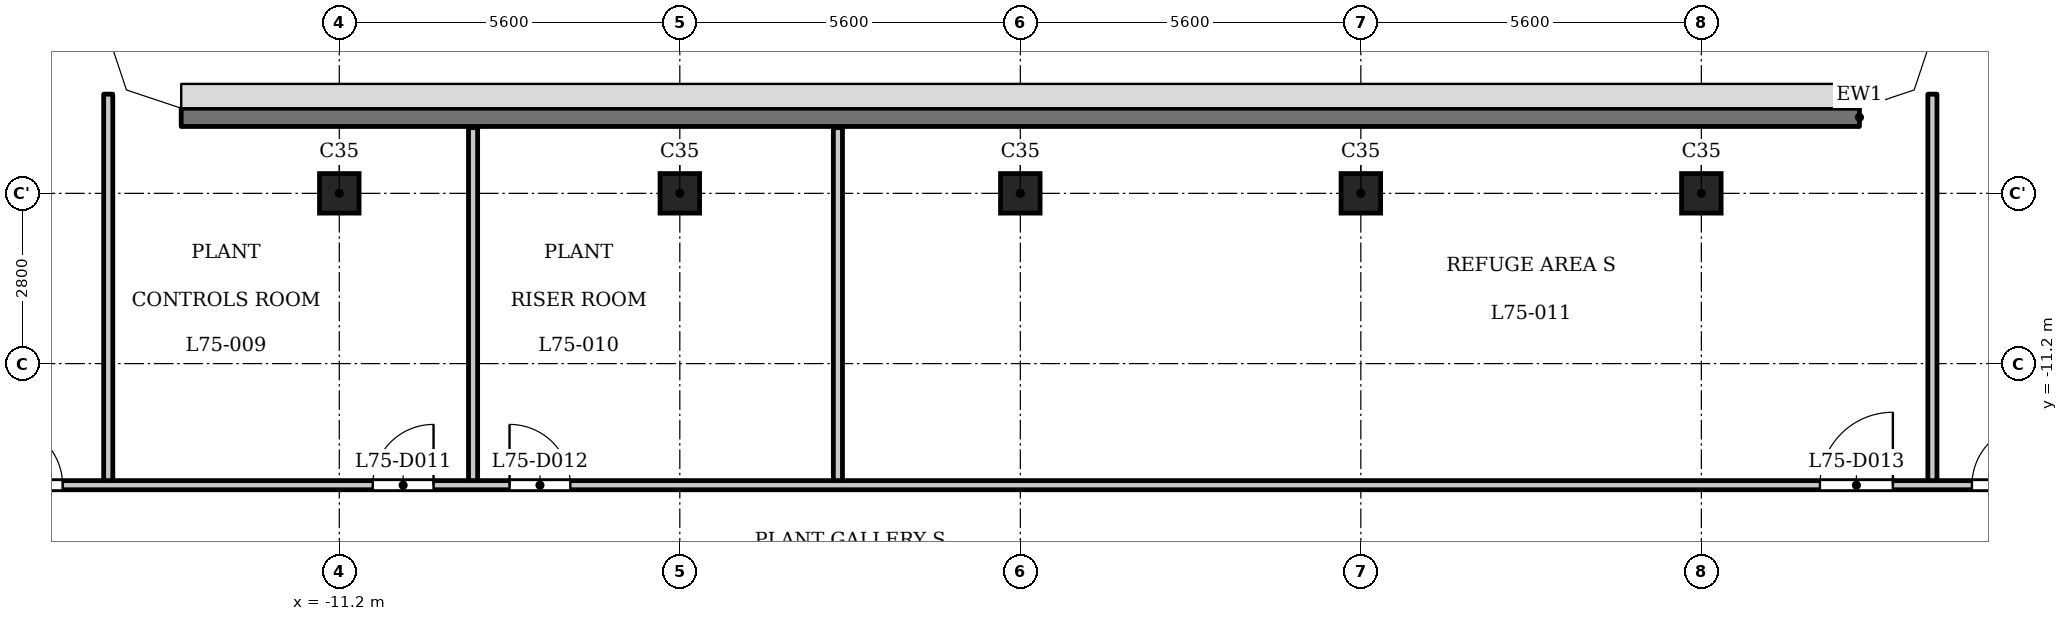
"""IFC4 building model, lengths in metres.
Left out: names, types, materials, properties, quantities, classifications, styles, units other than length and angle.
Written with IfcOpenShell. Run it as: python <this file> out.ifc"""

import sys

from ifc_helpers import new_model, si_unit, direction, frame, frame_2d, origin, origin_2d, place, context, subcontext, project, spatial, polyline, rectangle, outline, extrude, element, fill, save


model = new_model("IFC4")
c1 = context("Model", 3, precision=1e-05, world=origin(), true_north=direction((0.0, 1.0)))
c2 = subcontext(c1, "Body", "Model", "MODEL_VIEW")
j1 = project(units=[si_unit("LENGTHUNIT", "METRE"), si_unit("PLANEANGLEUNIT", "RADIAN")], contexts=[c1])
p1 = place(None, origin())
s1 = spatial("IfcSite", under=j1, at=p1, CompositionType="ELEMENT")
p2 = place(p1, origin())
s2 = spatial("IfcBuilding", under=s1, at=p2, CompositionType="ELEMENT")
p3 = place(p2, frame((0.0, 0.0, 289.1)))
s3 = spatial("IfcBuildingStorey", under=s2, at=p3, CompositionType="ELEMENT", Elevation=289.1)
for number, where, z_axis, x_axis in (
    (1, (-11.2, -8.4, 0.0), (0.0, 0.0, 1.0), (1.0, 0.0, 0.0)),
    (2, (-5.6, -8.4, 0.0), (0.0, 0.0, 1.0), (1.0, 0.0, 0.0)),
    (3, (0.0, -8.4, 0.0), (0.0, 0.0, 1.0), (1.0, 0.0, 0.0)),
    (4, (5.6, -8.4, 0.0), (0.0, 0.0, 1.0), (1.0, 0.0, 0.0)),
    (5, (11.2, -8.4, 0.0), (0.0, 0.0, 1.0), (1.0, 0.0, 0.0)),
):
    element("IfcColumn", number, at=place(p3, frame(where, z_axis=z_axis, x_axis=x_axis)), inside=s3, PredefinedType="COLUMN", context=c2, shape_type="SweptSolid", body=[
        extrude(rectangle(XDim=0.65, YDim=0.65, at=origin_2d()), origin(), (0.0, 0.0, 1.0), 5.4),
    ])
p4 = place(p3, frame((13.8, -7.15, 0.0), z_axis=(0.0, 0.0, 1.0), x_axis=(-1.0, 0.0, 0.0)))
e6 = element("IfcWall", 6, at=p4, inside=s3, PredefinedType="SOLIDWALL", context=c2, shape_type="SweptSolid", body=[
    extrude(rectangle(XDim=27.6, YDim=0.3, at=frame_2d((13.8, 0.0))), origin(), (0.0, 0.0, 1.0), 5.0),
])
p5 = place(p3, frame((-17.4, -13.2, 0.0), z_axis=(0.0, 0.0, 1.0), x_axis=(1.0, 0.0, 0.0)))
e7 = element("IfcWall", 7, at=p5, inside=s3, PredefinedType="PARTITIONING", context=c2, shape_type="SweptSolid", body=[
    extrude(rectangle(XDim=34.8, YDim=0.15, at=frame_2d((17.4, 0.0))), origin(), (0.0, 0.0, 1.0), 5.0),
])
p6 = place(p5, frame((0.65, 0.0, 0.0)))
e8 = element("IfcOpeningElement", 8, at=p6, cuts=e7, PredefinedType="OPENING", context=c2, shape_type="SweptSolid", body=[
    extrude(rectangle(XDim=1.0, YDim=2.1, at=frame_2d((0.5, 1.05))), frame((0.0, 0.085, 0.0), z_axis=(0.0, -1.0, 0.0), x_axis=(1.0, 0.0, 0.0)), (0.0, 0.0, 1.0), 0.17),
])
p7 = place(p5, frame((33.05, 0.0, 0.0)))
e9 = element("IfcOpeningElement", 9, at=p7, cuts=e7, PredefinedType="OPENING", context=c2, shape_type="SweptSolid", body=[
    extrude(rectangle(XDim=1.0, YDim=2.1, at=frame_2d((0.5, 1.05))), frame((0.0, 0.085, 0.0), z_axis=(0.0, -1.0, 0.0), x_axis=(1.0, 0.0, 0.0)), (0.0, 0.0, 1.0), 0.17),
])
p8 = place(p5, frame((6.75, 0.0, 0.0)))
e10 = element("IfcOpeningElement", 10, at=p8, cuts=e7, PredefinedType="OPENING", context=c2, shape_type="SweptSolid", body=[
    extrude(rectangle(XDim=1.0, YDim=2.1, at=frame_2d((0.5, 1.05))), frame((0.0, 0.085, 0.0), z_axis=(0.0, -1.0, 0.0), x_axis=(1.0, 0.0, 0.0)), (0.0, 0.0, 1.0), 0.17),
])
p9 = place(p5, frame((9.0, 0.0, 0.0)))
e11 = element("IfcOpeningElement", 11, at=p9, cuts=e7, PredefinedType="OPENING", context=c2, shape_type="SweptSolid", body=[
    extrude(rectangle(XDim=1.0, YDim=2.1, at=frame_2d((0.5, 1.05))), frame((0.0, 0.085, 0.0), z_axis=(0.0, -1.0, 0.0), x_axis=(1.0, 0.0, 0.0)), (0.0, 0.0, 1.0), 0.17),
])
p10 = place(p5, frame((30.55, 0.0, 0.0)))
e12 = element("IfcOpeningElement", 12, at=p10, cuts=e7, PredefinedType="OPENING", context=c2, shape_type="SweptSolid", body=[
    extrude(rectangle(XDim=1.2, YDim=2.1, at=frame_2d((0.6, 1.05))), frame((0.0, 0.085, 0.0), z_axis=(0.0, -1.0, 0.0), x_axis=(1.0, 0.0, 0.0)), (0.0, 0.0, 1.0), 0.17),
])
p11 = place(p3, frame((-15.0, -13.125, 0.0), z_axis=(0.0, 0.0, 1.0), x_axis=(0.0, 1.0, 0.0)))
e13 = element("IfcWall", 13, at=p11, inside=s3, PredefinedType="PARTITIONING", context=c2, shape_type="SweptSolid", body=[
    extrude(rectangle(XDim=6.356, YDim=0.15, at=frame_2d((3.178, 0.0))), origin(), (0.0, 0.0, 1.0), 5.0),
])
p12 = place(p3, frame((-9.0, -13.125, 0.0), z_axis=(0.0, 0.0, 1.0), x_axis=(0.0, 1.0, 0.0)))
e14 = element("IfcWall", 14, at=p12, inside=s3, PredefinedType="PARTITIONING", context=c2, shape_type="SweptSolid", body=[
    extrude(rectangle(XDim=5.805, YDim=0.15, at=frame_2d((2.902, 0.0))), origin(), (0.0, 0.0, 1.0), 5.0),
])
p13 = place(p3, frame((-3.0, -13.125, 0.0), z_axis=(0.0, 0.0, 1.0), x_axis=(0.0, 1.0, 0.0)))
e15 = element("IfcWall", 15, at=p13, inside=s3, PredefinedType="PARTITIONING", context=c2, shape_type="SweptSolid", body=[
    extrude(rectangle(XDim=5.805, YDim=0.15, at=frame_2d((2.902, 0.0))), origin(), (0.0, 0.0, 1.0), 3.8),
])
p14 = place(p3, frame((15.0, -13.125, 0.0), z_axis=(0.0, 0.0, 1.0), x_axis=(0.0, 1.0, 0.0)))
e16 = element("IfcWall", 16, at=p14, inside=s3, PredefinedType="PARTITIONING", context=c2, shape_type="SweptSolid", body=[
    extrude(rectangle(XDim=6.356, YDim=0.15, at=frame_2d((3.178, 0.0))), origin(), (0.0, 0.0, 1.0), 5.0),
])
p15 = place(p3, origin())
e17 = element("IfcWall", 17, at=p15, inside=s3, PredefinedType="SOLIDWALL", context=c2, shape_type="SweptSolid", body=[
    extrude(outline(polyline([(14.937, -6.937), (15.3, -5.849), (15.3, -5.8), (15.0, -5.8), (14.7, -6.7), (13.8, -7.0), (13.8, -7.3), (13.849, -7.3), (14.937, -6.937)])), origin(), (0.0, 0.0, 1.0), 5.0),
])
e18 = element("IfcWall", 18, at=p15, inside=s3, PredefinedType="SOLIDWALL", context=c2, shape_type="SweptSolid", body=[
    extrude(outline(polyline([(-14.937, -6.937), (-13.849, -7.3), (-13.8, -7.3), (-13.8, -7.0), (-14.7, -6.7), (-15.0, -5.8), (-15.3, -5.8), (-15.3, -5.849), (-14.937, -6.937)])), origin(), (0.0, 0.0, 1.0), 5.0),
])
p16 = place(p6, origin())
e19 = element("IfcDoor", 19, at=p16, inside=s3, OperationType="SINGLE_SWING_RIGHT", PredefinedType="DOOR", context=c2, shape_type="SweptSolid", body=[
    extrude(rectangle(XDim=1.0, YDim=2.1, at=frame_2d((0.5, 1.05))), frame((0.0, 0.025, 0.0), z_axis=(0.0, -1.0, 0.0), x_axis=(1.0, 0.0, 0.0)), (0.0, 0.0, 1.0), 0.05),
])
fill(e8, e19)
p17 = place(p7, origin())
e20 = element("IfcDoor", 20, at=p17, inside=s3, OperationType="SINGLE_SWING_LEFT", PredefinedType="DOOR", context=c2, shape_type="SweptSolid", body=[
    extrude(rectangle(XDim=1.0, YDim=2.1, at=frame_2d((0.5, 1.05))), frame((0.0, 0.025, 0.0), z_axis=(0.0, -1.0, 0.0), x_axis=(1.0, 0.0, 0.0)), (0.0, 0.0, 1.0), 0.05),
])
fill(e9, e20)
p18 = place(p8, origin())
e21 = element("IfcDoor", 21, at=p18, inside=s3, OperationType="SINGLE_SWING_LEFT", PredefinedType="DOOR", context=c2, shape_type="SweptSolid", body=[
    extrude(rectangle(XDim=1.0, YDim=2.1, at=frame_2d((0.5, 1.05))), frame((0.0, 0.025, 0.0), z_axis=(0.0, -1.0, 0.0), x_axis=(1.0, 0.0, 0.0)), (0.0, 0.0, 1.0), 0.05),
])
fill(e10, e21)
p19 = place(p9, origin())
e22 = element("IfcDoor", 22, at=p19, inside=s3, OperationType="SINGLE_SWING_RIGHT", PredefinedType="DOOR", context=c2, shape_type="SweptSolid", body=[
    extrude(rectangle(XDim=1.0, YDim=2.1, at=frame_2d((0.5, 1.05))), frame((0.0, 0.025, 0.0), z_axis=(0.0, -1.0, 0.0), x_axis=(1.0, 0.0, 0.0)), (0.0, 0.0, 1.0), 0.05),
])
fill(e11, e22)
p20 = place(p10, origin())
e23 = element("IfcDoor", 23, at=p20, inside=s3, OperationType="SINGLE_SWING_LEFT", PredefinedType="DOOR", context=c2, shape_type="SweptSolid", body=[
    extrude(rectangle(XDim=1.2, YDim=2.1, at=frame_2d((0.6, 1.05))), frame((0.0, 0.025, 0.0), z_axis=(0.0, -1.0, 0.0), x_axis=(1.0, 0.0, 0.0)), (0.0, 0.0, 1.0), 0.05),
])
fill(e12, e23)
save(model, sys.argv[1])
